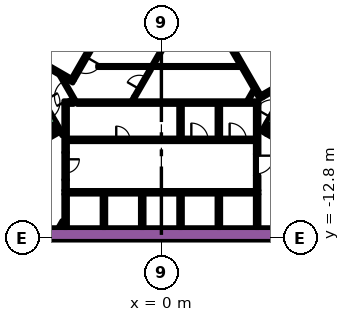
"""IFC4 building model, lengths in metres.
Left out: names, types, materials, properties, quantities, classifications, styles, units other than length and angle.
Written with IfcOpenShell. Run it as: python <this file> out.ifc"""

import sys

from ifc_helpers import new_model, si_unit, direction, frame, frame_2d, origin, place, context, subcontext, project, spatial, polyline, rectangle, outline, extrude, element, fill, save


model = new_model("IFC4")
c1 = context("Model", 3, precision=1e-05, world=origin(), true_north=direction((0.0, 1.0)))
c2 = subcontext(c1, "Body", "Model", "MODEL_VIEW")
j1 = project(units=[si_unit("LENGTHUNIT", "METRE"), si_unit("PLANEANGLEUNIT", "RADIAN")], contexts=[c1])
p1 = place(None, origin())
s1 = spatial("IfcSite", under=j1, at=p1, CompositionType="ELEMENT")
p2 = place(p1, origin())
s2 = spatial("IfcBuilding", under=s1, at=p2, CompositionType="ELEMENT")
p3 = place(p2, frame((0.0, 0.0, 16.2)))
s3 = spatial("IfcBuildingStorey", under=s2, at=p3, CompositionType="ELEMENT", Elevation=16.2)
p4 = place(p3, frame((6.776, 13.364, 0.0), z_axis=(0.0, 0.0, 1.0), x_axis=(0.500004177138, -0.8660229921, 0.0)))
e1 = element("IfcWall", 1, at=p4, inside=s3, PredefinedType="SOLIDWALL", context=c2, shape_type="SweptSolid", body=[
    extrude(rectangle(XDim=20.204, YDim=0.9, at=frame_2d((10.102, 0.0))), origin(), (0.0, 0.0, 1.0), 5.4),
])
p5 = place(p3, frame((-15.36, -1.503, 0.0), z_axis=(0.0, 0.0, 1.0), x_axis=(0.50000389221, 0.866023156604, 0.0)))
e2 = element("IfcWall", 2, at=p5, inside=s3, PredefinedType="SOLIDWALL", context=c2, shape_type="SweptSolid", body=[
    extrude(rectangle(XDim=21.0, YDim=0.9, at=frame_2d((10.5, 0.0))), origin(), (0.0, 0.0, 1.0), 5.4),
])
p6 = place(p3, frame((-12.019, -12.55, 0.0), z_axis=(0.0, 0.0, 1.0), x_axis=(1.0, 0.0, 0.0)))
e3 = element("IfcWall", 3, at=p6, inside=s3, PredefinedType="SOLIDWALL", context=c2, shape_type="SweptSolid", body=[
    extrude(rectangle(XDim=21.63, YDim=0.9, at=frame_2d((10.815, 0.0))), origin(), (0.0, 0.0, 1.0), 5.4),
])
p7 = place(p3, frame((12.84, -9.261, 0.0), z_axis=(0.0, 0.0, 1.0), x_axis=(-0.866013990052, 0.500019768644, 0.0)))
e4 = element("IfcWall", 4, at=p7, inside=s3, PredefinedType="SOLIDWALL", context=c2, shape_type="SweptSolid", body=[
    extrude(rectangle(XDim=6.8, YDim=0.25, at=frame_2d((3.4, 0.0))), origin(), (0.0, 0.0, 1.0), 5.4),
])
p8 = place(p3, frame((6.78, -5.906, 0.0), z_axis=(0.0, 0.0, 1.0), x_axis=(0.500223362819, 0.865896406789, 0.0)))
e5 = element("IfcWall", 5, at=p8, inside=s3, PredefinedType="SOLIDWALL", context=c2, shape_type="SweptSolid", body=[
    extrude(rectangle(XDim=0.675, YDim=0.25, at=frame_2d((0.337, 0.0))), origin(), (0.0, 0.0, 1.0), 5.4),
])
p9 = place(p3, frame((-12.84, -9.261, 0.0), z_axis=(0.0, 0.0, 1.0), x_axis=(0.866016039709, 0.500016218704, 0.0)))
e6 = element("IfcWall", 6, at=p9, inside=s3, PredefinedType="SOLIDWALL", context=c2, shape_type="SweptSolid", body=[
    extrude(rectangle(XDim=7.05, YDim=0.25, at=frame_2d((3.525, 0.0))), origin(), (0.0, 0.0, 1.0), 5.4),
])
p10 = place(p3, frame((-6.905, -5.69, 0.0), z_axis=(0.0, 0.0, 1.0), x_axis=(-0.500402024738, 0.865793170242, 0.0)))
e7 = element("IfcWall", 7, at=p10, inside=s3, PredefinedType="SOLIDWALL", context=c2, shape_type="SweptSolid", body=[
    extrude(rectangle(XDim=0.425, YDim=0.25, at=frame_2d((0.212, 0.0))), origin(), (0.0, 0.0, 1.0), 5.4),
])
p11 = place(p3, frame((-6.425, -9.775, 0.0), z_axis=(0.0, 0.0, 1.0), x_axis=(1.0, 0.0, 0.0)))
e8 = element("IfcWall", 8, at=p11, inside=s3, PredefinedType="SOLIDWALL", context=c2, shape_type="SweptSolid", body=[
    extrude(rectangle(XDim=12.85, YDim=0.25, at=frame_2d((6.425, 0.0))), origin(), (0.0, 0.0, 1.0), 5.4),
])
p12 = place(p3, frame((-6.3, -9.9, 0.0), z_axis=(0.0, 0.0, 1.0), x_axis=(0.0, -1.0, 0.0)))
e9 = element("IfcWall", 9, at=p12, inside=s3, PredefinedType="SOLIDWALL", context=c2, shape_type="SweptSolid", body=[
    extrude(rectangle(XDim=2.2, YDim=0.25, at=frame_2d((1.1, 0.0))), origin(), (0.0, 0.0, 1.0), 5.4),
])
p13 = place(p3, frame((-6.3, -9.65, 0.0), z_axis=(0.0, 0.0, 1.0), x_axis=(0.0, 1.0, 0.0)))
e10 = element("IfcWall", 10, at=p13, inside=s3, PredefinedType="SOLIDWALL", context=c2, shape_type="SweptSolid", body=[
    extrude(rectangle(XDim=0.695, YDim=0.25, at=frame_2d((0.348, 0.0))), origin(), (0.0, 0.0, 1.0), 5.4),
])
p14 = place(p3, frame((-5.545, -3.875, 0.0), z_axis=(0.0, 0.0, 1.0), x_axis=(1.0, 0.0, 0.0)))
e11 = element("IfcWall", 11, at=p14, inside=s3, PredefinedType="SOLIDWALL", context=c2, shape_type="SweptSolid", body=[
    extrude(rectangle(XDim=11.97, YDim=0.25, at=frame_2d((5.985, 0.0))), origin(), (0.0, 0.0, 1.0), 5.4),
])
p15 = place(p3, frame((-6.425, -3.875, 0.0), z_axis=(0.0, 0.0, 1.0), x_axis=(1.0, 0.0, 0.0)))
e12 = element("IfcWall", 12, at=p15, inside=s3, PredefinedType="SOLIDWALL", context=c2, shape_type="SweptSolid", body=[
    extrude(rectangle(XDim=0.658, YDim=0.25, at=frame_2d((0.329, 0.0))), origin(), (0.0, 0.0, 1.0), 5.4),
])
p16 = place(p3, frame((6.3, -7.27, 0.0), z_axis=(0.0, 0.0, 1.0), x_axis=(0.0, 1.0, 0.0)))
e13 = element("IfcWall", 13, at=p16, inside=s3, PredefinedType="SOLIDWALL", context=c2, shape_type="SweptSolid", body=[
    extrude(rectangle(XDim=3.27, YDim=0.25, at=frame_2d((1.635, 0.0))), origin(), (0.0, 0.0, 1.0), 5.4),
])
p17 = place(p3, frame((6.3, -8.672, 0.0), z_axis=(0.0, 0.0, 1.0), x_axis=(0.0, -1.0, 0.0)))
e14 = element("IfcWall", 14, at=p17, inside=s3, PredefinedType="SOLIDWALL", context=c2, shape_type="SweptSolid", body=[
    extrude(rectangle(XDim=0.978, YDim=0.25, at=frame_2d((0.489, 0.0))), origin(), (0.0, 0.0, 1.0), 5.4),
])
for number, where, z_axis, x_axis in (
    (15, (3.78, -4.0, 0.0), (0.0, 0.0, 1.0), (0.0, -1.0, 0.0)),
    (16, (1.26, -4.0, 0.0), (0.0, 0.0, 1.0), (0.0, -1.0, 0.0)),
):
    element("IfcWall", number, at=place(p3, frame(where, z_axis=z_axis, x_axis=x_axis)), inside=s3, PredefinedType="SOLIDWALL", context=c2, shape_type="SweptSolid", body=[
        extrude(rectangle(XDim=2.2, YDim=0.25, at=frame_2d((1.1, 0.0))), origin(), (0.0, 0.0, 1.0), 5.4),
    ])
p18 = place(p3, frame((-6.3, -4.0, 0.0), z_axis=(0.0, 0.0, 1.0), x_axis=(0.0, -1.0, 0.0)))
e17 = element("IfcWall", 17, at=p18, inside=s3, PredefinedType="SOLIDWALL", context=c2, shape_type="SweptSolid", body=[
    extrude(rectangle(XDim=3.154, YDim=0.25, at=frame_2d((1.577, 0.0))), origin(), (0.0, 0.0, 1.0), 5.4),
])
for number, where, z_axis, x_axis in (
    (18, (6.3, -9.9, 0.0), (0.0, 0.0, 1.0), (0.0, -1.0, 0.0)),
    (19, (3.78, -9.9, 0.0), (0.0, 0.0, 1.0), (0.0, -1.0, 0.0)),
    (20, (1.26, -9.9, 0.0), (0.0, 0.0, 1.0), (0.0, -1.0, 0.0)),
    (21, (-1.26, -9.9, 0.0), (0.0, 0.0, 1.0), (0.0, -1.0, 0.0)),
    (22, (-3.78, -9.9, 0.0), (0.0, 0.0, 1.0), (0.0, -1.0, 0.0)),
):
    element("IfcWall", number, at=place(p3, frame(where, z_axis=z_axis, x_axis=x_axis)), inside=s3, PredefinedType="SOLIDWALL", context=c2, shape_type="SweptSolid", body=[
        extrude(rectangle(XDim=2.2, YDim=0.25, at=frame_2d((1.1, 0.0))), origin(), (0.0, 0.0, 1.0), 5.4),
    ])
p19 = place(p3, origin())
e23 = element("IfcWall", 23, at=p19, inside=s3, PredefinedType="SOLIDWALL", context=c2, shape_type="SweptSolid", body=[
    extrude(outline(polyline([(6.552, -3.348), (6.677, -3.564), (6.46, -3.689), (0.448, 6.725), (0.565, 6.725), (0.566, 6.725), (0.566, 6.725), (0.566, 6.875), (0.566, 6.875), (0.565, 6.875), (0.361, 6.875), (0.035, 7.439), (0.252, 7.564), (0.377, 7.348), (6.552, -3.348)])), origin(), (0.0, 0.0, 1.0), 5.4),
])
p20 = place(p3, frame((6.614, -3.456, 0.0), z_axis=(0.0, 0.0, 1.0), x_axis=(0.866031582473, 0.499989298045, 0.0)))
e24 = element("IfcWall", 24, at=p20, inside=s3, PredefinedType="SOLIDWALL", context=c2, shape_type="SweptSolid", body=[
    extrude(rectangle(XDim=2.455, YDim=0.25, at=frame_2d((1.228, 0.0))), origin(), (0.0, 0.0, 1.0), 5.4),
])
p21 = place(p3, frame((-8.06, -1.311, 0.0), z_axis=(0.0, 0.0, 1.0), x_axis=(0.50000273126, 0.866023826885, 0.0)))
e25 = element("IfcWall", 25, at=p21, inside=s3, PredefinedType="SOLIDWALL", context=c2, shape_type="SweptSolid", body=[
    extrude(rectangle(XDim=10.33, YDim=0.25, at=frame_2d((5.165, 0.0))), origin(), (0.0, 0.0, 1.0), 5.4),
])
e26 = element("IfcWall", 26, at=p19, inside=s3, PredefinedType="SOLIDWALL", context=c2, shape_type="SweptSolid", body=[
    extrude(outline(polyline([(-5.922, -2.257), (-5.922, -2.257), (-5.705, -2.382), (-5.83, -2.598), (-6.483, -2.221), (-6.591, -2.033), (-6.591, -2.033), (-6.7, -2.096), (-7.952, -1.373), (-7.827, -1.156), (-5.922, -2.257)])), origin(), (0.0, 0.0, 1.0), 5.4),
])
p22 = place(p3, frame((-6.708, -12.068, 0.0), z_axis=(0.0, 0.0, 1.0), x_axis=(0.500000789788, 0.8660249478, 0.0)))
e27 = element("IfcWall", 27, at=p22, inside=s3, PredefinedType="PARTITIONING", context=c2, shape_type="SweptSolid", body=[
    extrude(rectangle(XDim=0.456, YDim=0.15, at=frame_2d((0.228, 0.0))), origin(), (0.0, 0.0, 1.0), 4.1),
])
p23 = place(p3, frame((-6.534, -12.068, 0.0), z_axis=(0.0, 0.0, 1.0), x_axis=(0.500240224089, 0.865886665912, 0.0)))
e28 = element("IfcWall", 28, at=p23, inside=s3, PredefinedType="PARTITIONING", context=c2, shape_type="SweptSolid", body=[
    extrude(rectangle(XDim=0.109, YDim=0.15, at=frame_2d((0.054, 0.0))), origin(), (0.0, 0.0, 1.0), 4.1),
])
p24 = place(p3, frame((-6.48, -6.027, 0.0), z_axis=(0.0, 0.0, 1.0), x_axis=(-0.499927229454, 0.866067413802, 0.0)))
e29 = element("IfcWall", 29, at=p24, inside=s3, PredefinedType="PARTITIONING", context=c2, shape_type="SweptSolid", body=[
    extrude(rectangle(XDim=0.929, YDim=0.15, at=frame_2d((0.464, 0.0))), origin(), (0.0, 0.0, 1.0), 5.4),
])
p25 = place(p3, frame((-1.887, -3.718, 0.0), z_axis=(0.0, 0.0, 1.0), x_axis=(0.500165633897, 0.865929753888, 0.0)))
e30 = element("IfcWall", 30, at=p25, inside=s3, PredefinedType="PARTITIONING", context=c2, shape_type="SweptSolid", body=[
    extrude(rectangle(XDim=0.254, YDim=0.15, at=frame_2d((0.127, 0.0))), origin(), (0.0, 0.0, 1.0), 4.1),
])
p26 = place(p3, frame((6.945, -5.222, 0.0), z_axis=(0.0, 0.0, 1.0), x_axis=(-0.499818422106, -0.866130212453, 0.0)))
e31 = element("IfcWall", 31, at=p26, inside=s3, PredefinedType="PARTITIONING", context=c2, shape_type="SweptSolid", body=[
    extrude(rectangle(XDim=0.514, YDim=0.15, at=frame_2d((0.257, 0.0))), origin(), (0.0, 0.0, 1.0), 4.1),
])
p27 = place(p3, frame((5.705, -3.718, 0.0), z_axis=(0.0, 0.0, 1.0), x_axis=(0.499962090823, 0.866047289552, 0.0)))
e32 = element("IfcWall", 32, at=p27, inside=s3, PredefinedType="PARTITIONING", context=c2, shape_type="SweptSolid", body=[
    extrude(rectangle(XDim=0.735, YDim=0.15, at=frame_2d((0.367, 0.0))), origin(), (0.0, 0.0, 1.0), 4.1),
])
p28 = place(p3, frame((-4.2, -1.5, 0.0), z_axis=(0.0, 0.0, 1.0), x_axis=(1.0, 0.0, 0.0)))
e33 = element("IfcWall", 33, at=p28, inside=s3, PredefinedType="PARTITIONING", context=c2, shape_type="SweptSolid", body=[
    extrude(rectangle(XDim=9.359, YDim=0.15, at=frame_2d((4.68, 0.0))), origin(), (0.0, 0.0, 1.0), 4.1),
])
p29 = place(p3, frame((-0.544, -1.393, 0.0), z_axis=(0.0, 0.0, 1.0), x_axis=(0.499928740635, 0.866066541489, 0.0)))
e34 = element("IfcWall", 34, at=p29, inside=s3, PredefinedType="PARTITIONING", context=c2, shape_type="SweptSolid", body=[
    extrude(rectangle(XDim=1.912, YDim=0.15, at=frame_2d((0.956, 0.0))), origin(), (0.0, 0.0, 1.0), 4.1),
])
p30 = place(p3, frame((-6.175, -6.325, 0.0), z_axis=(0.0, 0.0, 1.0), x_axis=(1.0, 0.0, 0.0)))
e35 = element("IfcWall", 35, at=p30, inside=s3, PredefinedType="SOLIDWALL", context=c2, shape_type="SweptSolid", body=[
    extrude(rectangle(XDim=12.35, YDim=0.25, at=frame_2d((6.175, 0.0))), origin(), (0.0, 0.0, 1.0), 5.4),
])
p31 = place(p30, frame((3.205, 0.0, 0.0)))
e36 = element("IfcOpeningElement", 36, at=p31, cuts=e35, PredefinedType="OPENING", context=c2, shape_type="SweptSolid", body=[
    extrude(rectangle(XDim=0.9, YDim=2.1, at=frame_2d((0.45, 1.05))), frame((0.0, 0.135, 0.0), z_axis=(0.0, -1.0, 0.0), x_axis=(1.0, 0.0, 0.0)), (0.0, 0.0, 1.0), 0.27),
])
p32 = place(p30, frame((8.145, 0.0, 0.0)))
e37 = element("IfcOpeningElement", 37, at=p32, cuts=e35, PredefinedType="OPENING", context=c2, shape_type="SweptSolid", body=[
    extrude(rectangle(XDim=1.1, YDim=2.1, at=frame_2d((0.55, 1.05))), frame((0.0, 0.135, 0.0), z_axis=(0.0, -1.0, 0.0), x_axis=(1.0, 0.0, 0.0)), (0.0, 0.0, 1.0), 0.27),
])
p33 = place(p30, frame((10.665, 0.0, 0.0)))
e38 = element("IfcOpeningElement", 38, at=p33, cuts=e35, PredefinedType="OPENING", context=c2, shape_type="SweptSolid", body=[
    extrude(rectangle(XDim=1.1, YDim=2.1, at=frame_2d((0.55, 1.05))), frame((0.0, 0.135, 0.0), z_axis=(0.0, -1.0, 0.0), x_axis=(1.0, 0.0, 0.0)), (0.0, 0.0, 1.0), 0.27),
])
p34 = place(p3, frame((8.565, -2.185, 0.0), z_axis=(0.0, 0.0, 1.0), x_axis=(-0.499997954832, 0.866026584559, 0.0)))
e39 = element("IfcWall", 39, at=p34, inside=s3, PredefinedType="SOLIDWALL", context=c2, shape_type="SweptSolid", body=[
    extrude(rectangle(XDim=12.35, YDim=0.25, at=frame_2d((6.175, 0.0))), origin(), (0.0, 0.0, 1.0), 5.4),
])
p35 = place(p34, frame((5.725, 0.0, 0.0)))
e40 = element("IfcOpeningElement", 40, at=p35, cuts=e39, PredefinedType="OPENING", context=c2, shape_type="SweptSolid", body=[
    extrude(rectangle(XDim=0.9, YDim=2.1, at=frame_2d((0.45, 1.05))), frame((0.0, 0.135, 0.0), z_axis=(0.0, -1.0, 0.0), x_axis=(1.0, 0.0, 0.0)), (0.0, 0.0, 1.0), 0.27),
])
p36 = place(p3, frame((-0.898, 6.194, 0.0), z_axis=(0.0, 0.0, 1.0), x_axis=(-0.499996202215, -0.866027596426, 0.0)))
e41 = element("IfcWall", 41, at=p36, inside=s3, PredefinedType="SOLIDWALL", context=c2, shape_type="SweptSolid", body=[
    extrude(rectangle(XDim=9.83, YDim=0.25, at=frame_2d((4.915, 0.0))), origin(), (0.0, 0.0, 1.0), 5.4),
])
p37 = place(p36, frame((0.585, 0.0, 0.0)))
e42 = element("IfcOpeningElement", 42, at=p37, cuts=e41, PredefinedType="OPENING", context=c2, shape_type="SweptSolid", body=[
    extrude(rectangle(XDim=1.1, YDim=2.1, at=frame_2d((0.55, 1.05))), frame((0.0, 0.135, 0.0), z_axis=(0.0, -1.0, 0.0), x_axis=(1.0, 0.0, 0.0)), (0.0, 0.0, 1.0), 0.27),
])
p38 = place(p36, frame((3.105, 0.0, 0.0)))
e43 = element("IfcOpeningElement", 43, at=p38, cuts=e41, PredefinedType="OPENING", context=c2, shape_type="SweptSolid", body=[
    extrude(rectangle(XDim=1.1, YDim=2.1, at=frame_2d((0.55, 1.05))), frame((0.0, 0.135, 0.0), z_axis=(0.0, -1.0, 0.0), x_axis=(1.0, 0.0, 0.0)), (0.0, 0.0, 1.0), 0.27),
])
p39 = place(p36, frame((5.625, 0.0, 0.0)))
e44 = element("IfcOpeningElement", 44, at=p39, cuts=e41, PredefinedType="OPENING", context=c2, shape_type="SweptSolid", body=[
    extrude(rectangle(XDim=1.1, YDim=2.1, at=frame_2d((0.55, 1.05))), frame((0.0, 0.135, 0.0), z_axis=(0.0, -1.0, 0.0), x_axis=(1.0, 0.0, 0.0)), (0.0, 0.0, 1.0), 0.27),
])
p40 = place(p36, frame((8.145, 0.0, 0.0)))
e45 = element("IfcOpeningElement", 45, at=p40, cuts=e41, PredefinedType="OPENING", context=c2, shape_type="SweptSolid", body=[
    extrude(rectangle(XDim=1.1, YDim=2.1, at=frame_2d((0.55, 1.05))), frame((0.0, 0.135, 0.0), z_axis=(0.0, -1.0, 0.0), x_axis=(1.0, 0.0, 0.0)), (0.0, 0.0, 1.0), 0.27),
])
p41 = place(p3, frame((7.053, -5.284, 0.0), z_axis=(0.0, 0.0, 1.0), x_axis=(0.500078061341, 0.865980330357, 0.0)))
e46 = element("IfcWall", 46, at=p41, inside=s3, PredefinedType="SOLIDWALL", context=c2, shape_type="SweptSolid", body=[
    extrude(rectangle(XDim=2.1, YDim=0.4, at=frame_2d((1.05, 0.0))), origin(), (0.0, 0.0, 1.0), 5.4),
])
p42 = place(p41, frame((0.45, 0.0, 0.0)))
e47 = element("IfcOpeningElement", 47, at=p42, cuts=e46, PredefinedType="OPENING", context=c2, shape_type="SweptSolid", body=[
    extrude(rectangle(XDim=1.2, YDim=2.1, at=frame_2d((0.6, 1.05))), frame((0.0, 0.21, 0.0), z_axis=(0.0, -1.0, 0.0), x_axis=(1.0, 0.0, 0.0)), (0.0, 0.0, 1.0), 0.42),
])
p43 = place(p3, frame((-8.103, -3.466, 0.0), z_axis=(0.0, 0.0, 1.0), x_axis=(0.500078061341, -0.865980330357, 0.0)))
e48 = element("IfcWall", 48, at=p43, inside=s3, PredefinedType="SOLIDWALL", context=c2, shape_type="SweptSolid", body=[
    extrude(rectangle(XDim=2.1, YDim=0.4, at=frame_2d((1.05, 0.0))), origin(), (0.0, 0.0, 1.0), 5.4),
])
p44 = place(p43, frame((0.45, 0.0, 0.0)))
e49 = element("IfcOpeningElement", 49, at=p44, cuts=e48, PredefinedType="OPENING", context=c2, shape_type="SweptSolid", body=[
    extrude(rectangle(XDim=1.2, YDim=2.1, at=frame_2d((0.6, 1.05))), frame((0.0, 0.21, 0.0), z_axis=(0.0, -1.0, 0.0), x_axis=(1.0, 0.0, 0.0)), (0.0, 0.0, 1.0), 0.42),
])
p45 = place(p3, frame((-6.3, -7.154, 0.0), z_axis=(0.0, 0.0, 1.0), x_axis=(0.0, -1.0, 0.0)))
e50 = element("IfcWall", 50, at=p45, inside=s3, PredefinedType="SOLIDWALL", context=c2, shape_type="SweptSolid", body=[
    extrude(rectangle(XDim=1.8, YDim=0.25, at=frame_2d((0.9, 0.0))), origin(), (0.0, 0.0, 1.0), 5.4),
])
p46 = place(p45, frame((0.45, 0.0, 0.0)))
e51 = element("IfcOpeningElement", 51, at=p46, cuts=e50, PredefinedType="OPENING", context=c2, shape_type="SweptSolid", body=[
    extrude(rectangle(XDim=0.9, YDim=2.1, at=frame_2d((0.45, 1.05))), frame((0.0, 0.135, 0.0), z_axis=(0.0, -1.0, 0.0), x_axis=(1.0, 0.0, 0.0)), (0.0, 0.0, 1.0), 0.27),
])
p47 = place(p3, frame((-1.76, -3.498, 0.0), z_axis=(0.0, 0.0, 1.0), x_axis=(0.499977374825, 0.866038466041, 0.0)))
e52 = element("IfcWall", 52, at=p47, inside=s3, PredefinedType="PARTITIONING", context=c2, shape_type="SweptSolid", body=[
    extrude(rectangle(XDim=2.1, YDim=0.15, at=frame_2d((1.05, 0.0))), origin(), (0.0, 0.0, 1.0), 4.1),
])
p48 = place(p47, frame((0.6, 0.0, 0.0)))
e53 = element("IfcOpeningElement", 53, at=p48, cuts=e52, PredefinedType="OPENING", context=c2, shape_type="SweptSolid", body=[
    extrude(rectangle(XDim=0.9, YDim=2.1, at=frame_2d((0.45, 1.05))), frame((0.0, 0.085, 0.0), z_axis=(0.0, -1.0, 0.0), x_axis=(1.0, 0.0, 0.0)), (0.0, 0.0, 1.0), 0.17),
])
p49 = place(p3, frame((-5.606, -3.89, 0.0), z_axis=(0.0, 0.0, 1.0), x_axis=(-0.500027713859, 0.866009402589, 0.0)))
e54 = element("IfcWall", 54, at=p49, inside=s3, PredefinedType="PARTITIONING", context=c2, shape_type="SweptSolid", body=[
    extrude(rectangle(XDim=2.1, YDim=0.15, at=frame_2d((1.05, 0.0))), origin(), (0.0, 0.0, 1.0), 4.1),
])
p50 = place(p49, frame((0.45, 0.0, 0.0)))
e55 = element("IfcOpeningElement", 55, at=p50, cuts=e54, PredefinedType="OPENING", context=c2, shape_type="SweptSolid", body=[
    extrude(rectangle(XDim=1.2, YDim=2.1, at=frame_2d((0.6, 1.05))), frame((0.0, 0.085, 0.0), z_axis=(0.0, -1.0, 0.0), x_axis=(1.0, 0.0, 0.0)), (0.0, 0.0, 1.0), 0.17),
])
p51 = place(p3, frame((6.22, -7.266, 0.0), z_axis=(0.0, 0.0, 1.0), x_axis=(0.0, -1.0, 0.0)))
e56 = element("IfcWall", 56, at=p51, inside=s3, PredefinedType="PARTITIONING", context=c2, shape_type="SweptSolid", body=[
    extrude(rectangle(XDim=1.4, YDim=0.09, at=frame_2d((0.7, 0.0))), origin(), (0.0, 0.0, 1.0), 4.1),
])
p52 = place(p51, frame((0.1, 0.0, 0.0)))
e57 = element("IfcOpeningElement", 57, at=p52, cuts=e56, PredefinedType="OPENING", context=c2, shape_type="SweptSolid", body=[
    extrude(rectangle(XDim=1.2, YDim=2.1, at=frame_2d((0.6, 1.05))), frame((0.0, 0.055, 0.0), z_axis=(0.0, -1.0, 0.0), x_axis=(1.0, 0.0, 0.0)), (0.0, 0.0, 1.0), 0.11),
])
for number, where, z_axis, x_axis in (
    (58, (38.25, -14.145, 0.0), (0.0, 0.0, 1.0), (-0.5, 0.866, 0.0)),
    (59, (-6.875, 40.198, 0.0), (0.0, 0.0, 1.0), (-0.5, -0.866, 0.0)),
):
    element("IfcWall", number, at=place(p3, frame(where, z_axis=z_axis, x_axis=x_axis)), inside=s3, PredefinedType="SOLIDWALL", context=c2, shape_type="SweptSolid", body=[
        extrude(rectangle(XDim=62.75, YDim=0.25, at=frame_2d((31.375, 0.0))), origin(), (0.0, 0.0, 1.0), 5.0),
    ])
p53 = place(p31, origin())
e60 = element("IfcDoor", 60, at=p53, inside=s3, OperationType="SINGLE_SWING_LEFT", PredefinedType="DOOR", context=c2, shape_type="SweptSolid", body=[
    extrude(rectangle(XDim=0.9, YDim=2.1, at=frame_2d((0.45, 1.05))), frame((0.0, 0.025, 0.0), z_axis=(0.0, -1.0, 0.0), x_axis=(1.0, 0.0, 0.0)), (0.0, 0.0, 1.0), 0.05),
])
fill(e36, e60)
p54 = place(p32, origin())
e61 = element("IfcDoor", 61, at=p54, inside=s3, OperationType="DOUBLE_DOOR_SLIDING", PredefinedType="DOOR", context=c2, shape_type="SweptSolid", body=[
    extrude(rectangle(XDim=1.1, YDim=2.1, at=frame_2d((0.55, 1.05))), frame((0.0, 0.025, 0.0), z_axis=(0.0, -1.0, 0.0), x_axis=(1.0, 0.0, 0.0)), (0.0, 0.0, 1.0), 0.05),
])
fill(e37, e61)
p55 = place(p33, origin())
e62 = element("IfcDoor", 62, at=p55, inside=s3, OperationType="DOUBLE_DOOR_SLIDING", PredefinedType="DOOR", context=c2, shape_type="SweptSolid", body=[
    extrude(rectangle(XDim=1.1, YDim=2.1, at=frame_2d((0.55, 1.05))), frame((0.0, 0.025, 0.0), z_axis=(0.0, -1.0, 0.0), x_axis=(1.0, 0.0, 0.0)), (0.0, 0.0, 1.0), 0.05),
])
fill(e38, e62)
p56 = place(p40, origin())
e63 = element("IfcDoor", 63, at=p56, inside=s3, OperationType="DOUBLE_DOOR_SLIDING", PredefinedType="DOOR", context=c2, shape_type="SweptSolid", body=[
    extrude(rectangle(XDim=1.1, YDim=2.1, at=frame_2d((0.55, 1.05))), frame((0.0, 0.025, 0.0), z_axis=(0.0, -1.0, 0.0), x_axis=(1.0, 0.0, 0.0)), (0.0, 0.0, 1.0), 0.05),
])
fill(e45, e63)
p57 = place(p46, origin())
e64 = element("IfcDoor", 64, at=p57, inside=s3, OperationType="SINGLE_SWING_LEFT", PredefinedType="DOOR", context=c2, shape_type="SweptSolid", body=[
    extrude(rectangle(XDim=0.9, YDim=2.1, at=frame_2d((0.45, 1.05))), frame((0.0, 0.025, 0.0), z_axis=(0.0, -1.0, 0.0), x_axis=(1.0, 0.0, 0.0)), (0.0, 0.0, 1.0), 0.05),
])
fill(e51, e64)
p58 = place(p48, origin())
e65 = element("IfcDoor", 65, at=p58, inside=s3, OperationType="SINGLE_SWING_LEFT", PredefinedType="DOOR", context=c2, shape_type="SweptSolid", body=[
    extrude(rectangle(XDim=0.9, YDim=2.1, at=frame_2d((0.45, 1.05))), frame((0.0, 0.025, 0.0), z_axis=(0.0, -1.0, 0.0), x_axis=(1.0, 0.0, 0.0)), (0.0, 0.0, 1.0), 0.05),
])
fill(e53, e65)
p59 = place(p50, origin())
e66 = element("IfcDoor", 66, at=p59, inside=s3, OperationType="SINGLE_SWING_LEFT", PredefinedType="DOOR", context=c2, shape_type="SweptSolid", body=[
    extrude(rectangle(XDim=1.2, YDim=2.1, at=frame_2d((0.6, 1.05))), frame((0.0, 0.025, 0.0), z_axis=(0.0, -1.0, 0.0), x_axis=(1.0, 0.0, 0.0)), (0.0, 0.0, 1.0), 0.05),
])
fill(e55, e66)
p60 = place(p52, origin())
e67 = element("IfcDoor", 67, at=p60, inside=s3, OperationType="SINGLE_SWING_LEFT", PredefinedType="DOOR", context=c2, shape_type="SweptSolid", body=[
    extrude(rectangle(XDim=1.2, YDim=2.1, at=frame_2d((0.6, 1.05))), frame((0.0, 0.025, 0.0), z_axis=(0.0, -1.0, 0.0), x_axis=(1.0, 0.0, 0.0)), (0.0, 0.0, 1.0), 0.05),
])
fill(e57, e67)
save(model, sys.argv[1])
